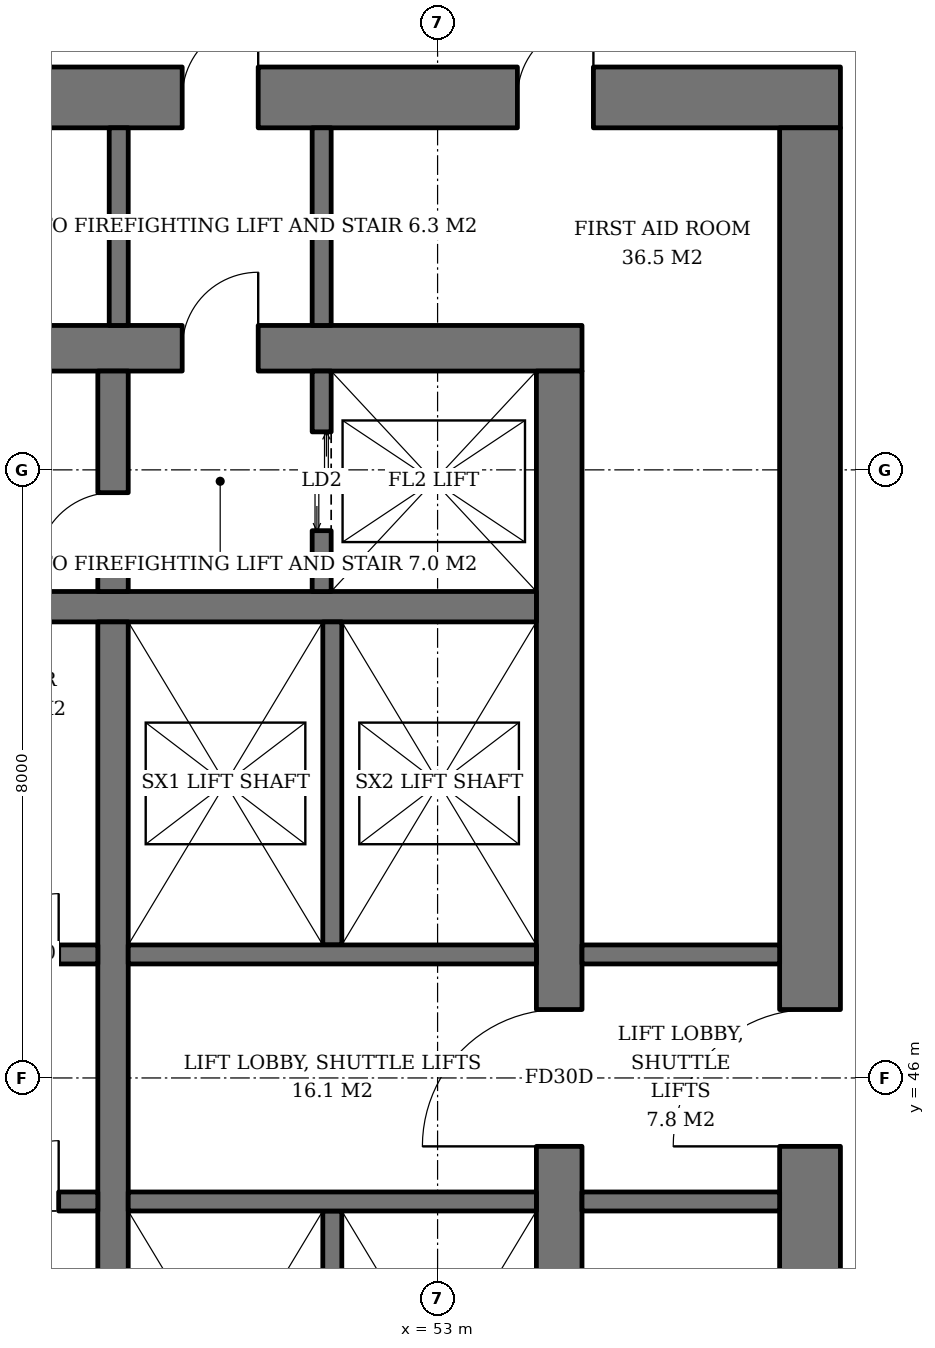
"""IFC4 building model, lengths in metres.
Left out: names, types, materials, properties, quantities, classifications, styles, units other than length and angle.
Written with IfcOpenShell. Run it as: python <this file> out.ifc"""

import sys

from ifc_helpers import new_model, si_unit, direction, frame, frame_2d, origin, place, context, subcontext, project, spatial, rectangle, extrude, element, fill, save


model = new_model("IFC4")
c1 = context("Model", 3, precision=1e-05, world=origin(), true_north=direction((0.0, 1.0)))
c2 = subcontext(c1, "Body", "Model", "MODEL_VIEW")
j1 = project(units=[si_unit("LENGTHUNIT", "METRE"), si_unit("PLANEANGLEUNIT", "RADIAN")], contexts=[c1])
p1 = place(None, origin())
s1 = spatial("IfcSite", under=j1, at=p1, CompositionType="ELEMENT")
p2 = place(p1, origin())
s2 = spatial("IfcBuilding", under=s1, at=p2, CompositionType="ELEMENT")
p3 = place(p2, frame((0.0, 0.0, 47.6)))
s3 = spatial("IfcBuildingStorey", under=s2, at=p3, CompositionType="ELEMENT", Elevation=47.6)
p4 = place(p3, frame((35.1, 55.6, 0.0), z_axis=(0.0, 0.0, 1.0), x_axis=(1.0, 0.0, 0.0)))
e1 = element("IfcWall", 1, at=p4, inside=s3, PredefinedType="SHEAR", context=c2, shape_type="SweptSolid", body=[
    extrude(rectangle(XDim=19.8, YDim=0.6, at=frame_2d((9.9, 0.0))), origin(), (0.0, 0.0, 1.0), 3.8),
])
p5 = place(p4, frame((14.54, 0.0, 0.0)))
e2 = element("IfcOpeningElement", 2, at=p5, cuts=e1, PredefinedType="OPENING", context=c2, shape_type="SweptSolid", body=[
    extrude(rectangle(XDim=1.0, YDim=2.1, at=frame_2d((0.5, 1.05))), frame((0.0, 0.31, 0.0), z_axis=(0.0, -1.0, 0.0), x_axis=(1.0, 0.0, 0.0)), (0.0, 0.0, 1.0), 0.62),
])
p6 = place(p4, frame((2.425, 0.0, 0.0)))
e3 = element("IfcOpeningElement", 3, at=p6, cuts=e1, PredefinedType="OPENING", context=c2, shape_type="SweptSolid", body=[
    extrude(rectangle(XDim=1.0, YDim=2.1, at=frame_2d((0.5, 1.05))), frame((0.0, 0.31, 0.0), z_axis=(0.0, -1.0, 0.0), x_axis=(1.0, 0.0, 0.0)), (0.0, 0.0, 1.0), 0.62),
])
p7 = place(p3, frame((54.6, 36.7, 0.0), z_axis=(0.0, 0.0, 1.0), x_axis=(0.0, 1.0, 0.0)))
e4 = element("IfcWall", 4, at=p7, inside=s3, PredefinedType="SHEAR", context=c2, shape_type="SweptSolid", body=[
    extrude(rectangle(XDim=18.6, YDim=0.6, at=frame_2d((9.3, 0.0))), origin(), (0.0, 0.0, 1.0), 3.8),
])
p8 = place(p7, frame((8.4, 0.0, 0.0)))
e5 = element("IfcOpeningElement", 5, at=p8, cuts=e4, PredefinedType="OPENING", context=c2, shape_type="SweptSolid", body=[
    extrude(rectangle(XDim=1.8, YDim=2.4, at=frame_2d((0.9, 1.2))), frame((0.0, 0.31, 0.0), z_axis=(0.0, -1.0, 0.0), x_axis=(1.0, 0.0, 0.0)), (0.0, 0.0, 1.0), 0.62),
])
p9 = place(p3, frame((31.7, 58.9, 0.0), z_axis=(0.0, 0.0, 1.0), x_axis=(1.0, 0.0, 0.0)))
e6 = element("IfcWall", 6, at=p9, inside=s3, PredefinedType="SHEAR", context=c2, shape_type="SweptSolid", body=[
    extrude(rectangle(XDim=26.6, YDim=0.8, at=frame_2d((13.3, 0.0))), origin(), (0.0, 0.0, 1.0), 3.8),
])
p10 = place(p9, frame((17.94, 0.0, 0.0)))
e7 = element("IfcOpeningElement", 7, at=p10, cuts=e6, PredefinedType="OPENING", context=c2, shape_type="SweptSolid", body=[
    extrude(rectangle(XDim=1.0, YDim=2.1, at=frame_2d((0.5, 1.05))), frame((0.0, 0.41, 0.0), z_axis=(0.0, -1.0, 0.0), x_axis=(1.0, 0.0, 0.0)), (0.0, 0.0, 1.0), 0.82),
])
p11 = place(p9, frame((5.825, 0.0, 0.0)))
e8 = element("IfcOpeningElement", 8, at=p11, cuts=e6, PredefinedType="OPENING", context=c2, shape_type="SweptSolid", body=[
    extrude(rectangle(XDim=1.0, YDim=2.1, at=frame_2d((0.5, 1.05))), frame((0.0, 0.41, 0.0), z_axis=(0.0, -1.0, 0.0), x_axis=(1.0, 0.0, 0.0)), (0.0, 0.0, 1.0), 0.82),
])
p12 = place(p9, frame((1.233, 0.0, 0.0)))
e9 = element("IfcOpeningElement", 9, at=p12, cuts=e6, PredefinedType="OPENING", context=c2, shape_type="SweptSolid", body=[
    extrude(rectangle(XDim=1.0, YDim=2.1, at=frame_2d((0.5, 1.05))), frame((0.0, 0.41, 0.0), z_axis=(0.0, -1.0, 0.0), x_axis=(1.0, 0.0, 0.0)), (0.0, 0.0, 1.0), 0.82),
])
p13 = place(p9, frame((2.733, 0.0, 0.0)))
e10 = element("IfcOpeningElement", 10, at=p13, cuts=e6, PredefinedType="OPENING", context=c2, shape_type="SweptSolid", body=[
    extrude(rectangle(XDim=1.0, YDim=2.1, at=frame_2d((0.5, 1.05))), frame((0.0, 0.41, 0.0), z_axis=(0.0, -1.0, 0.0), x_axis=(1.0, 0.0, 0.0)), (0.0, 0.0, 1.0), 0.82),
])
p14 = place(p9, frame((4.229, 0.0, 0.0)))
e11 = element("IfcOpeningElement", 11, at=p14, cuts=e6, PredefinedType="OPENING", context=c2, shape_type="SweptSolid", body=[
    extrude(rectangle(XDim=1.0, YDim=2.1, at=frame_2d((0.5, 1.05))), frame((0.0, 0.41, 0.0), z_axis=(0.0, -1.0, 0.0), x_axis=(1.0, 0.0, 0.0)), (0.0, 0.0, 1.0), 0.82),
])
p15 = place(p9, frame((9.126, 0.0, 0.0)))
e12 = element("IfcOpeningElement", 12, at=p15, cuts=e6, PredefinedType="OPENING", context=c2, shape_type="SweptSolid", body=[
    extrude(rectangle(XDim=1.0, YDim=2.1, at=frame_2d((0.5, 1.05))), frame((0.0, 0.41, 0.0), z_axis=(0.0, -1.0, 0.0), x_axis=(1.0, 0.0, 0.0)), (0.0, 0.0, 1.0), 0.82),
])
p16 = place(p9, frame((14.029, 0.0, 0.0)))
e13 = element("IfcOpeningElement", 13, at=p16, cuts=e6, PredefinedType="OPENING", context=c2, shape_type="SweptSolid", body=[
    extrude(rectangle(XDim=1.0, YDim=2.1, at=frame_2d((0.5, 1.05))), frame((0.0, 0.41, 0.0), z_axis=(0.0, -1.0, 0.0), x_axis=(1.0, 0.0, 0.0)), (0.0, 0.0, 1.0), 0.82),
])
p17 = place(p9, frame((22.35, 0.0, 0.0)))
e14 = element("IfcOpeningElement", 14, at=p17, cuts=e6, PredefinedType="OPENING", context=c2, shape_type="SweptSolid", body=[
    extrude(rectangle(XDim=1.0, YDim=2.1, at=frame_2d((0.5, 1.05))), frame((0.0, 0.41, 0.0), z_axis=(0.0, -1.0, 0.0), x_axis=(1.0, 0.0, 0.0)), (0.0, 0.0, 1.0), 0.82),
])
p18 = place(p3, frame((57.9, 33.5, 0.0), z_axis=(0.0, 0.0, 1.0), x_axis=(0.0, 1.0, 0.0)))
e15 = element("IfcWall", 15, at=p18, inside=s3, PredefinedType="SHEAR", context=c2, shape_type="SweptSolid", body=[
    extrude(rectangle(XDim=25.0, YDim=0.8, at=frame_2d((12.5, 0.0))), origin(), (0.0, 0.0, 1.0), 3.8),
])
p19 = place(p18, frame((11.6, 0.0, 0.0)))
e16 = element("IfcOpeningElement", 16, at=p19, cuts=e15, PredefinedType="OPENING", context=c2, shape_type="SweptSolid", body=[
    extrude(rectangle(XDim=1.8, YDim=2.4, at=frame_2d((0.9, 1.2))), frame((0.0, 0.41, 0.0), z_axis=(0.0, -1.0, 0.0), x_axis=(1.0, 0.0, 0.0)), (0.0, 0.0, 1.0), 0.82),
])
p20 = place(p3, frame((35.7, 52.2, 0.0), z_axis=(0.0, 0.0, 1.0), x_axis=(1.0, 0.0, 0.0)))
e17 = element("IfcWall", 17, at=p20, inside=s3, PredefinedType="SHEAR", context=c2, shape_type="SweptSolid", body=[
    extrude(rectangle(XDim=18.6, YDim=0.4, at=frame_2d((9.3, 0.0))), origin(), (0.0, 0.0, 1.0), 3.8),
])
p21 = place(p3, frame((48.73, 40.0, 0.0), z_axis=(0.0, 0.0, 1.0), x_axis=(0.0, 1.0, 0.0)))
e18 = element("IfcWall", 18, at=p21, inside=s3, PredefinedType="SHEAR", context=c2, shape_type="SweptSolid", body=[
    extrude(rectangle(XDim=12.0, YDim=0.4, at=frame_2d((6.0, 0.0))), origin(), (0.0, 0.0, 1.0), 3.8),
])
p22 = place(p3, frame((48.73, 52.4, 0.0), z_axis=(0.0, 0.0, 1.0), x_axis=(0.0, 1.0, 0.0)))
e19 = element("IfcWall", 19, at=p22, inside=s3, PredefinedType="SHEAR", context=c2, shape_type="SweptSolid", body=[
    extrude(rectangle(XDim=2.9, YDim=0.4, at=frame_2d((1.45, 0.0))), origin(), (0.0, 0.0, 1.0), 3.8),
])
p23 = place(p22, frame((0.3, 0.0, 0.0)))
e20 = element("IfcOpeningElement", 20, at=p23, cuts=e19, PredefinedType="OPENING", context=c2, shape_type="SweptSolid", body=[
    extrude(rectangle(XDim=1.0, YDim=2.1, at=frame_2d((0.5, 1.05))), frame((0.0, 0.21, 0.0), z_axis=(0.0, -1.0, 0.0), x_axis=(1.0, 0.0, 0.0)), (0.0, 0.0, 1.0), 0.42),
])
p24 = place(p3, frame((51.475, 52.4, 0.0), z_axis=(0.0, 0.0, 1.0), x_axis=(0.0, 1.0, 0.0)))
e21 = element("IfcWall", 21, at=p24, inside=s3, PredefinedType="SHEAR", context=c2, shape_type="SweptSolid", body=[
    extrude(rectangle(XDim=2.9, YDim=0.25, at=frame_2d((1.45, 0.0))), origin(), (0.0, 0.0, 1.0), 3.8),
])
p25 = place(p24, frame((0.8, 0.0, 0.0)))
e22 = element("IfcOpeningElement", 22, at=p25, cuts=e21, PredefinedType="OPENING", context=c2, shape_type="SweptSolid", body=[
    extrude(rectangle(XDim=1.3, YDim=2.2, at=frame_2d((0.65, 1.1))), frame((0.0, 0.135, 0.0), z_axis=(0.0, -1.0, 0.0), x_axis=(1.0, 0.0, 0.0)), (0.0, 0.0, 1.0), 0.27),
])
p26 = place(p3, frame((35.7, 47.625, 0.0), z_axis=(0.0, 0.0, 1.0), x_axis=(1.0, 0.0, 0.0)))
e23 = element("IfcWall", 23, at=p26, inside=s3, PredefinedType="SHEAR", context=c2, shape_type="SweptSolid", body=[
    extrude(rectangle(XDim=12.83, YDim=0.25, at=frame_2d((6.415, 0.0))), origin(), (0.0, 0.0, 1.0), 3.8),
])
p27 = place(p26, frame((0.7, 0.0, 0.0)))
e24 = element("IfcOpeningElement", 24, at=p27, cuts=e23, PredefinedType="OPENING", context=c2, shape_type="SweptSolid", body=[
    extrude(rectangle(XDim=1.1, YDim=2.2, at=frame_2d((0.55, 1.1))), frame((0.0, 0.135, 0.0), z_axis=(0.0, -1.0, 0.0), x_axis=(1.0, 0.0, 0.0)), (0.0, 0.0, 1.0), 0.27),
])
p28 = place(p26, frame((3.45, 0.0, 0.0)))
e25 = element("IfcOpeningElement", 25, at=p28, cuts=e23, PredefinedType="OPENING", context=c2, shape_type="SweptSolid", body=[
    extrude(rectangle(XDim=1.1, YDim=2.2, at=frame_2d((0.55, 1.1))), frame((0.0, 0.135, 0.0), z_axis=(0.0, -1.0, 0.0), x_axis=(1.0, 0.0, 0.0)), (0.0, 0.0, 1.0), 0.27),
])
p29 = place(p26, frame((6.2, 0.0, 0.0)))
e26 = element("IfcOpeningElement", 26, at=p29, cuts=e23, PredefinedType="OPENING", context=c2, shape_type="SweptSolid", body=[
    extrude(rectangle(XDim=1.1, YDim=2.2, at=frame_2d((0.55, 1.1))), frame((0.0, 0.135, 0.0), z_axis=(0.0, -1.0, 0.0), x_axis=(1.0, 0.0, 0.0)), (0.0, 0.0, 1.0), 0.27),
])
p30 = place(p26, frame((8.95, 0.0, 0.0)))
e27 = element("IfcOpeningElement", 27, at=p30, cuts=e23, PredefinedType="OPENING", context=c2, shape_type="SweptSolid", body=[
    extrude(rectangle(XDim=1.1, YDim=2.2, at=frame_2d((0.55, 1.1))), frame((0.0, 0.135, 0.0), z_axis=(0.0, -1.0, 0.0), x_axis=(1.0, 0.0, 0.0)), (0.0, 0.0, 1.0), 0.27),
])
p31 = place(p26, frame((11.515, 0.0, 0.0)))
e28 = element("IfcOpeningElement", 28, at=p31, cuts=e23, PredefinedType="OPENING", context=c2, shape_type="SweptSolid", body=[
    extrude(rectangle(XDim=0.8, YDim=2.0, at=frame_2d((0.4, 1.0))), frame((0.0, 0.135, 0.0), z_axis=(0.0, -1.0, 0.0), x_axis=(1.0, 0.0, 0.0)), (0.0, 0.0, 1.0), 0.27),
])
p32 = place(p3, frame((35.7, 44.375, 0.0), z_axis=(0.0, 0.0, 1.0), x_axis=(1.0, 0.0, 0.0)))
e29 = element("IfcWall", 29, at=p32, inside=s3, PredefinedType="SHEAR", context=c2, shape_type="SweptSolid", body=[
    extrude(rectangle(XDim=12.83, YDim=0.25, at=frame_2d((6.415, 0.0))), origin(), (0.0, 0.0, 1.0), 3.8),
])
p33 = place(p32, frame((0.7, 0.0, 0.0)))
e30 = element("IfcOpeningElement", 30, at=p33, cuts=e29, PredefinedType="OPENING", context=c2, shape_type="SweptSolid", body=[
    extrude(rectangle(XDim=1.1, YDim=2.2, at=frame_2d((0.55, 1.1))), frame((0.0, 0.135, 0.0), z_axis=(0.0, -1.0, 0.0), x_axis=(1.0, 0.0, 0.0)), (0.0, 0.0, 1.0), 0.27),
])
p34 = place(p32, frame((3.45, 0.0, 0.0)))
e31 = element("IfcOpeningElement", 31, at=p34, cuts=e29, PredefinedType="OPENING", context=c2, shape_type="SweptSolid", body=[
    extrude(rectangle(XDim=1.1, YDim=2.2, at=frame_2d((0.55, 1.1))), frame((0.0, 0.135, 0.0), z_axis=(0.0, -1.0, 0.0), x_axis=(1.0, 0.0, 0.0)), (0.0, 0.0, 1.0), 0.27),
])
p35 = place(p32, frame((6.2, 0.0, 0.0)))
e32 = element("IfcOpeningElement", 32, at=p35, cuts=e29, PredefinedType="OPENING", context=c2, shape_type="SweptSolid", body=[
    extrude(rectangle(XDim=1.1, YDim=2.2, at=frame_2d((0.55, 1.1))), frame((0.0, 0.135, 0.0), z_axis=(0.0, -1.0, 0.0), x_axis=(1.0, 0.0, 0.0)), (0.0, 0.0, 1.0), 0.27),
])
p36 = place(p32, frame((8.95, 0.0, 0.0)))
e33 = element("IfcOpeningElement", 33, at=p36, cuts=e29, PredefinedType="OPENING", context=c2, shape_type="SweptSolid", body=[
    extrude(rectangle(XDim=1.1, YDim=2.2, at=frame_2d((0.55, 1.1))), frame((0.0, 0.135, 0.0), z_axis=(0.0, -1.0, 0.0), x_axis=(1.0, 0.0, 0.0)), (0.0, 0.0, 1.0), 0.27),
])
p37 = place(p32, frame((11.515, 0.0, 0.0)))
e34 = element("IfcOpeningElement", 34, at=p37, cuts=e29, PredefinedType="OPENING", context=c2, shape_type="SweptSolid", body=[
    extrude(rectangle(XDim=0.8, YDim=2.0, at=frame_2d((0.4, 1.0))), frame((0.0, 0.135, 0.0), z_axis=(0.0, -1.0, 0.0), x_axis=(1.0, 0.0, 0.0)), (0.0, 0.0, 1.0), 0.27),
])
p38 = place(p3, frame((51.615, 47.75, 0.0), z_axis=(0.0, 0.0, 1.0), x_axis=(0.0, 1.0, 0.0)))
e35 = element("IfcWall", 35, at=p38, inside=s3, PredefinedType="SHEAR", context=c2, shape_type="SweptSolid", body=[
    extrude(rectangle(XDim=4.25, YDim=0.25, at=frame_2d((2.125, 0.0))), origin(), (0.0, 0.0, 1.0), 3.8),
])
p39 = place(p3, frame((48.93, 47.625, 0.0), z_axis=(0.0, 0.0, 1.0), x_axis=(1.0, 0.0, 0.0)))
e36 = element("IfcWall", 36, at=p39, inside=s3, PredefinedType="SHEAR", context=c2, shape_type="SweptSolid", body=[
    extrude(rectangle(XDim=5.37, YDim=0.25, at=frame_2d((2.685, 0.0))), origin(), (0.0, 0.0, 1.0), 3.8),
])
p40 = place(p3, frame((51.615, 44.25, 0.0), z_axis=(0.0, 0.0, 1.0), x_axis=(0.0, -1.0, 0.0)))
e37 = element("IfcWall", 37, at=p40, inside=s3, PredefinedType="SHEAR", context=c2, shape_type="SweptSolid", body=[
    extrude(rectangle(XDim=4.25, YDim=0.25, at=frame_2d((2.125, 0.0))), origin(), (0.0, 0.0, 1.0), 3.8),
])
p41 = place(p3, frame((48.93, 44.375, 0.0), z_axis=(0.0, 0.0, 1.0), x_axis=(1.0, 0.0, 0.0)))
e38 = element("IfcWall", 38, at=p41, inside=s3, PredefinedType="SHEAR", context=c2, shape_type="SweptSolid", body=[
    extrude(rectangle(XDim=5.37, YDim=0.25, at=frame_2d((2.685, 0.0))), origin(), (0.0, 0.0, 1.0), 3.8),
])
for number, where, z_axis, x_axis in (
    (39, (48.805, 55.9, 0.0), (0.0, 0.0, 1.0), (0.0, 1.0, 0.0)),
    (40, (51.475, 55.9, 0.0), (0.0, 0.0, 1.0), (0.0, 1.0, 0.0)),
    (41, (54.9, 44.375, 0.0), (0.0, 0.0, 1.0), (1.0, 0.0, 0.0)),
    (42, (54.9, 47.625, 0.0), (0.0, 0.0, 1.0), (1.0, 0.0, 0.0)),
):
    element("IfcWall", number, at=place(p3, frame(where, z_axis=z_axis, x_axis=x_axis)), inside=s3, PredefinedType="SOLIDWALL", context=c2, shape_type="SweptSolid", body=[
        extrude(rectangle(XDim=2.6, YDim=0.25, at=frame_2d((1.3, 0.0))), origin(), (0.0, 0.0, 1.0), 3.62),
    ])
p42 = place(p25, origin())
e43 = element("IfcDoor", 43, at=p42, inside=s3, OperationType="DOUBLE_DOOR_SLIDING", PredefinedType="DOOR", context=c2, shape_type="SweptSolid", body=[
    extrude(rectangle(XDim=1.3, YDim=2.2, at=frame_2d((0.65, 1.1))), frame((0.0, 0.025, 0.0), z_axis=(0.0, -1.0, 0.0), x_axis=(1.0, 0.0, 0.0)), (0.0, 0.0, 1.0), 0.05),
])
fill(e22, e43)
p43 = place(p31, origin())
e44 = element("IfcDoor", 44, at=p43, inside=s3, OperationType="SINGLE_SWING_RIGHT", PredefinedType="DOOR", context=c2, shape_type="SweptSolid", body=[
    extrude(rectangle(XDim=0.8, YDim=2.0, at=frame_2d((0.4, 1.0))), frame((0.0, 0.025, 0.0), z_axis=(0.0, -1.0, 0.0), x_axis=(1.0, 0.0, 0.0)), (0.0, 0.0, 1.0), 0.05),
])
fill(e28, e44)
p44 = place(p37, origin())
e45 = element("IfcDoor", 45, at=p44, inside=s3, OperationType="SINGLE_SWING_RIGHT", PredefinedType="DOOR", context=c2, shape_type="SweptSolid", body=[
    extrude(rectangle(XDim=0.8, YDim=2.0, at=frame_2d((0.4, 1.0))), frame((0.0, 0.025, 0.0), z_axis=(0.0, -1.0, 0.0), x_axis=(1.0, 0.0, 0.0)), (0.0, 0.0, 1.0), 0.05),
])
fill(e34, e45)
p45 = place(p23, origin())
e46 = element("IfcDoor", 46, at=p45, inside=s3, OperationType="SINGLE_SWING_LEFT", PredefinedType="DOOR", context=c2, shape_type="SweptSolid", body=[
    extrude(rectangle(XDim=1.0, YDim=2.1, at=frame_2d((0.5, 1.05))), frame((0.0, 0.025, 0.0), z_axis=(0.0, -1.0, 0.0), x_axis=(1.0, 0.0, 0.0)), (0.0, 0.0, 1.0), 0.05),
])
fill(e20, e46)
p46 = place(p5, origin())
e47 = element("IfcDoor", 47, at=p46, inside=s3, OperationType="SINGLE_SWING_RIGHT", PredefinedType="DOOR", context=c2, shape_type="SweptSolid", body=[
    extrude(rectangle(XDim=1.0, YDim=2.1, at=frame_2d((0.5, 1.05))), frame((0.0, 0.025, 0.0), z_axis=(0.0, -1.0, 0.0), x_axis=(1.0, 0.0, 0.0)), (0.0, 0.0, 1.0), 0.05),
])
fill(e2, e47)
p47 = place(p8, origin())
e48 = element("IfcDoor", 48, at=p47, inside=s3, OperationType="DOUBLE_DOOR_SINGLE_SWING", PredefinedType="DOOR", context=c2, shape_type="SweptSolid", body=[
    extrude(rectangle(XDim=1.8, YDim=2.4, at=frame_2d((0.9, 1.2))), frame((0.0, 0.025, 0.0), z_axis=(0.0, -1.0, 0.0), x_axis=(1.0, 0.0, 0.0)), (0.0, 0.0, 1.0), 0.05),
])
fill(e5, e48)
p48 = place(p19, origin())
e49 = element("IfcDoor", 49, at=p48, inside=s3, OperationType="DOUBLE_DOOR_SINGLE_SWING", PredefinedType="DOOR", context=c2, shape_type="SweptSolid", body=[
    extrude(rectangle(XDim=1.8, YDim=2.4, at=frame_2d((0.9, 1.2))), frame((0.0, 0.025, 0.0), z_axis=(0.0, -1.0, 0.0), x_axis=(1.0, 0.0, 0.0)), (0.0, 0.0, 1.0), 0.05),
])
fill(e16, e49)
p49 = place(p10, origin())
e50 = element("IfcDoor", 50, at=p49, inside=s3, OperationType="SINGLE_SWING_RIGHT", PredefinedType="DOOR", context=c2, shape_type="SweptSolid", body=[
    extrude(rectangle(XDim=1.0, YDim=2.1, at=frame_2d((0.5, 1.05))), frame((0.0, 0.025, 0.0), z_axis=(0.0, -1.0, 0.0), x_axis=(1.0, 0.0, 0.0)), (0.0, 0.0, 1.0), 0.05),
])
fill(e7, e50)
p50 = place(p17, origin())
e51 = element("IfcDoor", 51, at=p50, inside=s3, OperationType="SINGLE_SWING_RIGHT", PredefinedType="DOOR", context=c2, shape_type="SweptSolid", body=[
    extrude(rectangle(XDim=1.0, YDim=2.1, at=frame_2d((0.5, 1.05))), frame((0.0, -0.34, 0.0), z_axis=(0.0, -1.0, 0.0), x_axis=(1.0, 0.0, 0.0)), (0.0, 0.0, 1.0), 0.05),
])
fill(e14, e51)
save(model, sys.argv[1])
